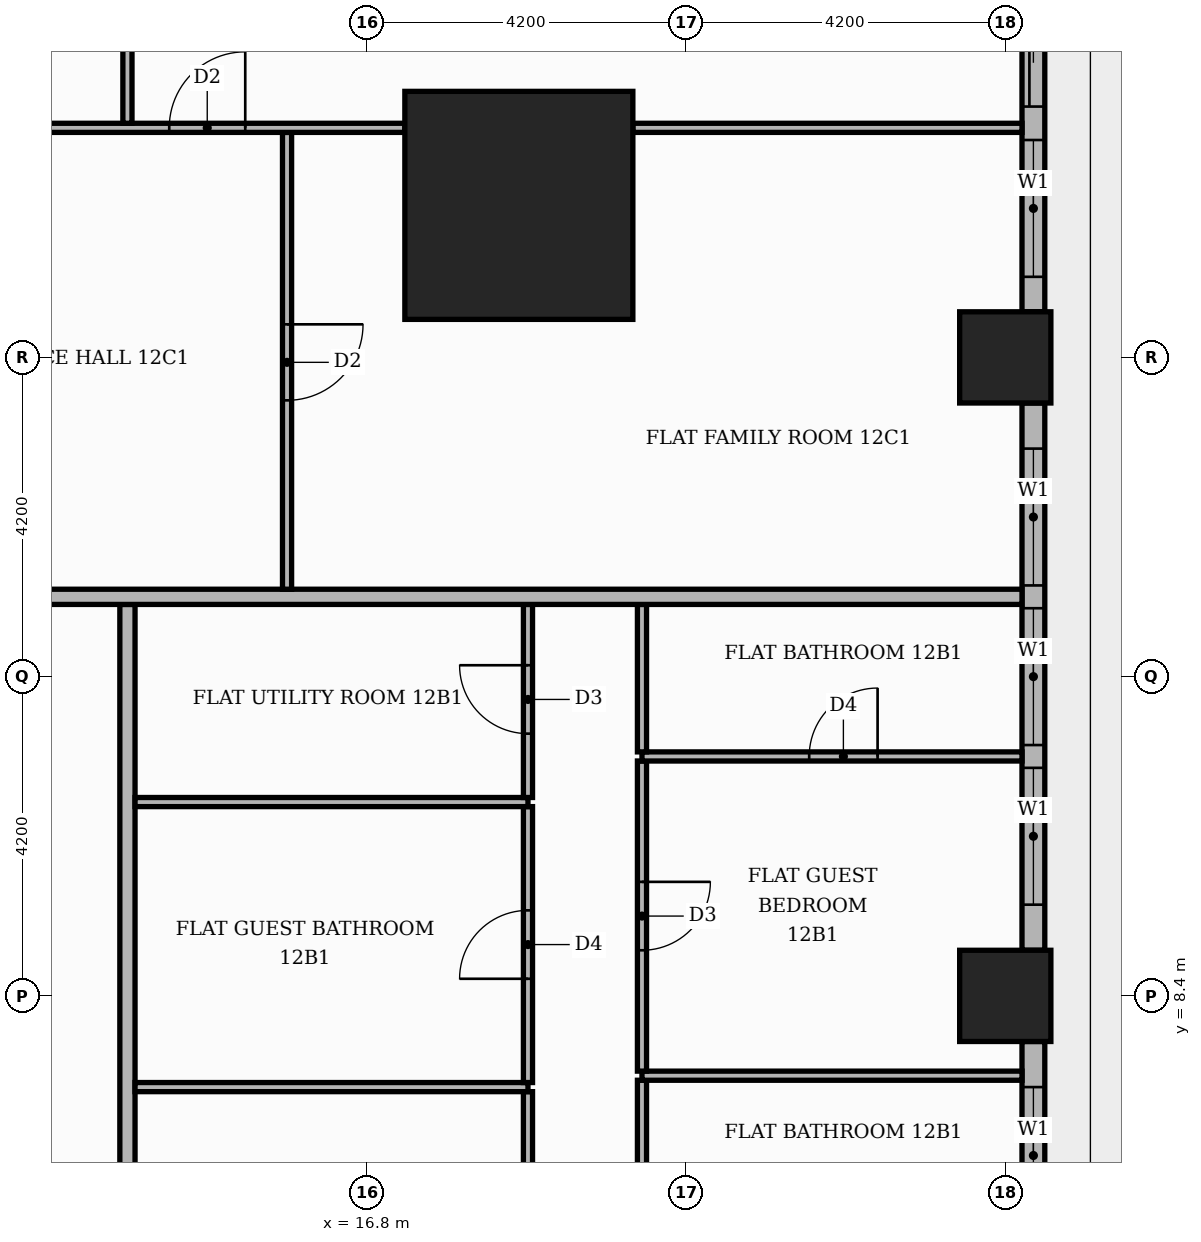
"""IFC4 building model, lengths in metres.
Left out: names, types, materials, properties, quantities, classifications, styles, units other than length and angle.
Written with IfcOpenShell. Run it as: python <this file> out.ifc"""

import sys

from ifc_helpers import new_model, si_unit, direction, frame, frame_2d, origin, origin_2d, place, context, subcontext, project, spatial, rectangle, extrude, element, fill, save


model = new_model("IFC4")
c1 = context("Model", 3, precision=1e-05, world=origin(), true_north=direction((0.0, 1.0)))
c2 = subcontext(c1, "Body", "Model", "MODEL_VIEW")
j1 = project(units=[si_unit("LENGTHUNIT", "METRE"), si_unit("PLANEANGLEUNIT", "RADIAN")], contexts=[c1])
p1 = place(None, origin())
s1 = spatial("IfcSite", under=j1, at=p1, CompositionType="ELEMENT")
p2 = place(p1, origin())
s2 = spatial("IfcBuilding", under=s1, at=p2, CompositionType="ELEMENT")
p3 = place(p2, frame((0.0, 0.0, 54.3)))
s3 = spatial("IfcBuildingStorey", under=s2, at=p3, CompositionType="ELEMENT", Elevation=54.3)
p4 = place(p3, frame((18.8, 18.8, 0.0), z_axis=(0.0, 0.0, 1.0), x_axis=(1.0, 0.0, 0.0)))
e1 = element("IfcColumn", 1, at=p4, inside=s3, PredefinedType="COLUMN", context=c2, shape_type="SweptSolid", body=[
    extrude(rectangle(XDim=3.0, YDim=3.0, at=origin_2d()), origin(), (0.0, 0.0, 1.0), 3.9),
])
for number, where, z_axis, x_axis in (
    (2, (25.2, 8.4, 0.0), (0.0, 0.0, 1.0), (1.0, 0.0, 0.0)),
    (3, (25.2, 16.8, 0.0), (0.0, 0.0, 1.0), (1.0, 0.0, 0.0)),
):
    element("IfcColumn", number, at=place(p3, frame(where, z_axis=z_axis, x_axis=x_axis)), inside=s3, PredefinedType="COLUMN", context=c2, shape_type="SweptSolid", body=[
        extrude(rectangle(XDim=1.2, YDim=1.2, at=origin_2d()), origin(), (0.0, 0.0, 1.0), 3.9),
    ])
p5 = place(p3, frame((25.57, 0.6, 0.0), z_axis=(0.0, 0.0, 1.0), x_axis=(0.0, 1.0, 0.0)))
e4 = element("IfcWall", 4, at=p5, inside=s3, PredefinedType="STANDARD", context=c2, shape_type="SweptSolid", body=[
    extrude(rectangle(XDim=7.2, YDim=0.3, at=frame_2d((3.6, 0.0))), origin(), (0.0, 0.0, 1.0), 3.48),
])
p6 = place(p5, frame((0.6, 0.0, 0.9)))
e5 = element("IfcOpeningElement", 5, at=p6, cuts=e4, PredefinedType="OPENING", context=c2, shape_type="SweptSolid", body=[
    extrude(rectangle(XDim=3.9, YDim=2.1, at=frame_2d((1.95, 1.05))), frame((0.0, 0.16, 0.0), z_axis=(0.0, -1.0, 0.0), x_axis=(1.0, 0.0, 0.0)), (0.0, 0.0, 1.0), 0.32),
])
p7 = place(p5, frame((4.8, 0.0, 0.9)))
e6 = element("IfcOpeningElement", 6, at=p7, cuts=e4, PredefinedType="OPENING", context=c2, shape_type="SweptSolid", body=[
    extrude(rectangle(XDim=1.8, YDim=2.1, at=frame_2d((0.9, 1.05))), frame((0.0, 0.16, 0.0), z_axis=(0.0, -1.0, 0.0), x_axis=(1.0, 0.0, 0.0)), (0.0, 0.0, 1.0), 0.32),
])
p8 = place(p3, frame((25.57, 9.0, 0.0), z_axis=(0.0, 0.0, 1.0), x_axis=(0.0, 1.0, 0.0)))
e7 = element("IfcWall", 7, at=p8, inside=s3, PredefinedType="STANDARD", context=c2, shape_type="SweptSolid", body=[
    extrude(rectangle(XDim=7.2, YDim=0.3, at=frame_2d((3.6, 0.0))), origin(), (0.0, 0.0, 1.0), 3.48),
])
p9 = place(p8, frame((0.6, 0.0, 0.9)))
e8 = element("IfcOpeningElement", 8, at=p9, cuts=e7, PredefinedType="OPENING", context=c2, shape_type="SweptSolid", body=[
    extrude(rectangle(XDim=1.8, YDim=2.1, at=frame_2d((0.9, 1.05))), frame((0.0, 0.16, 0.0), z_axis=(0.0, -1.0, 0.0), x_axis=(1.0, 0.0, 0.0)), (0.0, 0.0, 1.0), 0.32),
])
p10 = place(p8, frame((2.7, 0.0, 0.9)))
e9 = element("IfcOpeningElement", 9, at=p10, cuts=e7, PredefinedType="OPENING", context=c2, shape_type="SweptSolid", body=[
    extrude(rectangle(XDim=1.8, YDim=2.1, at=frame_2d((0.9, 1.05))), frame((0.0, 0.16, 0.0), z_axis=(0.0, -1.0, 0.0), x_axis=(1.0, 0.0, 0.0)), (0.0, 0.0, 1.0), 0.32),
])
p11 = place(p8, frame((4.8, 0.0, 0.9)))
e10 = element("IfcOpeningElement", 10, at=p11, cuts=e7, PredefinedType="OPENING", context=c2, shape_type="SweptSolid", body=[
    extrude(rectangle(XDim=1.8, YDim=2.1, at=frame_2d((0.9, 1.05))), frame((0.0, 0.16, 0.0), z_axis=(0.0, -1.0, 0.0), x_axis=(1.0, 0.0, 0.0)), (0.0, 0.0, 1.0), 0.32),
])
p12 = place(p3, frame((25.57, 17.4, 0.0), z_axis=(0.0, 0.0, 1.0), x_axis=(0.0, 1.0, 0.0)))
e11 = element("IfcWall", 11, at=p12, inside=s3, PredefinedType="STANDARD", context=c2, shape_type="SweptSolid", body=[
    extrude(rectangle(XDim=5.32, YDim=0.3, at=frame_2d((2.66, 0.0))), origin(), (0.0, 0.0, 1.0), 3.48),
])
p13 = place(p12, frame((2.7, 0.0, 0.0)))
e12 = element("IfcOpeningElement", 12, at=p13, cuts=e11, PredefinedType="OPENING", context=c2, shape_type="SweptSolid", body=[
    extrude(rectangle(XDim=1.8, YDim=2.4, at=frame_2d((0.9, 1.2))), frame((0.0, 0.16, 0.0), z_axis=(0.0, -1.0, 0.0), x_axis=(1.0, 0.0, 0.0)), (0.0, 0.0, 1.0), 0.32),
])
p14 = place(p12, frame((0.46, 0.0, 0.9)))
e13 = element("IfcOpeningElement", 13, at=p14, cuts=e11, PredefinedType="OPENING", context=c2, shape_type="SweptSolid", body=[
    extrude(rectangle(XDim=1.8, YDim=2.1, at=frame_2d((0.9, 1.05))), frame((0.0, 0.16, 0.0), z_axis=(0.0, -1.0, 0.0), x_axis=(1.0, 0.0, 0.0)), (0.0, 0.0, 1.0), 0.32),
])
p15 = place(p3, frame((13.65, -13.55, 0.0), z_axis=(0.0, 0.0, 1.0), x_axis=(0.0, 1.0, 0.0)))
e14 = element("IfcWall", 14, at=p15, inside=s3, PredefinedType="PARTITIONING", context=c2, shape_type="SweptSolid", body=[
    extrude(rectangle(XDim=27.1, YDim=0.2, at=frame_2d((13.55, 0.0))), origin(), (0.0, 0.0, 1.0), 3.48),
])
p16 = place(p15, frame((1.45, 0.0, 0.0)))
e15 = element("IfcOpeningElement", 15, at=p16, cuts=e14, PredefinedType="OPENING", context=c2, shape_type="SweptSolid", body=[
    extrude(rectangle(XDim=1.1, YDim=2.4, at=frame_2d((0.55, 1.2))), frame((0.0, 0.11, 0.0), z_axis=(0.0, -1.0, 0.0), x_axis=(1.0, 0.0, 0.0)), (0.0, 0.0, 1.0), 0.22),
])
p17 = place(p3, frame((18.92, 1.56, 0.0), z_axis=(0.0, 0.0, 1.0), x_axis=(0.0, 1.0, 0.0)))
e16 = element("IfcWall", 16, at=p17, inside=s3, PredefinedType="PARTITIONING", context=c2, shape_type="SweptSolid", body=[
    extrude(rectangle(XDim=5.58, YDim=0.12, at=frame_2d((2.79, 0.0))), origin(), (0.0, 0.0, 1.0), 3.48),
])
p18 = place(p17, frame((2.34, 0.0, 0.0)))
e17 = element("IfcOpeningElement", 17, at=p18, cuts=e16, PredefinedType="OPENING", context=c2, shape_type="SweptSolid", body=[
    extrude(rectangle(XDim=0.9, YDim=2.1, at=frame_2d((0.45, 1.05))), frame((0.0, 0.07, 0.0), z_axis=(0.0, -1.0, 0.0), x_axis=(1.0, 0.0, 0.0)), (0.0, 0.0, 1.0), 0.14),
])
p19 = place(p3, frame((20.42, 5.31, 0.0), z_axis=(0.0, 0.0, 1.0), x_axis=(0.0, 1.0, 0.0)))
e18 = element("IfcWall", 18, at=p19, inside=s3, PredefinedType="PARTITIONING", context=c2, shape_type="SweptSolid", body=[
    extrude(rectangle(XDim=1.98, YDim=0.12, at=frame_2d((0.99, 0.0))), origin(), (0.0, 0.0, 1.0), 3.48),
])
p20 = place(p3, frame((13.75, 7.2, 0.0), z_axis=(0.0, 0.0, 1.0), x_axis=(1.0, 0.0, 0.0)))
e19 = element("IfcWall", 19, at=p20, inside=s3, PredefinedType="PARTITIONING", context=c2, shape_type="SweptSolid", body=[
    extrude(rectangle(XDim=5.17, YDim=0.12, at=frame_2d((2.585, 0.0))), origin(), (0.0, 0.0, 1.0), 3.48),
])
p21 = place(p3, frame((18.92, 7.26, 0.0), z_axis=(0.0, 0.0, 1.0), x_axis=(0.0, 1.0, 0.0)))
e20 = element("IfcWall", 20, at=p21, inside=s3, PredefinedType="PARTITIONING", context=c2, shape_type="SweptSolid", body=[
    extrude(rectangle(XDim=3.63, YDim=0.12, at=frame_2d((1.815, 0.0))), origin(), (0.0, 0.0, 1.0), 3.48),
])
p22 = place(p21, frame((1.365, 0.0, 0.0)))
e21 = element("IfcOpeningElement", 21, at=p22, cuts=e20, PredefinedType="OPENING", context=c2, shape_type="SweptSolid", body=[
    extrude(rectangle(XDim=0.9, YDim=2.1, at=frame_2d((0.45, 1.05))), frame((0.0, 0.07, 0.0), z_axis=(0.0, -1.0, 0.0), x_axis=(1.0, 0.0, 0.0)), (0.0, 0.0, 1.0), 0.14),
])
p23 = place(p3, frame((20.42, 7.35, 0.0), z_axis=(0.0, 0.0, 1.0), x_axis=(1.0, 0.0, 0.0)))
e22 = element("IfcWall", 22, at=p23, inside=s3, PredefinedType="PARTITIONING", context=c2, shape_type="SweptSolid", body=[
    extrude(rectangle(XDim=5.0, YDim=0.12, at=frame_2d((2.5, 0.0))), origin(), (0.0, 0.0, 1.0), 3.48),
])
p24 = place(p3, frame((20.42, 7.41, 0.0), z_axis=(0.0, 0.0, 1.0), x_axis=(0.0, 1.0, 0.0)))
e23 = element("IfcWall", 23, at=p24, inside=s3, PredefinedType="PARTITIONING", context=c2, shape_type="SweptSolid", body=[
    extrude(rectangle(XDim=4.08, YDim=0.12, at=frame_2d((2.04, 0.0))), origin(), (0.0, 0.0, 1.0), 3.48),
])
p25 = place(p24, frame((1.59, 0.0, 0.0)))
e24 = element("IfcOpeningElement", 24, at=p25, cuts=e23, PredefinedType="OPENING", context=c2, shape_type="SweptSolid", body=[
    extrude(rectangle(XDim=0.9, YDim=2.1, at=frame_2d((0.45, 1.05))), frame((0.0, 0.07, 0.0), z_axis=(0.0, -1.0, 0.0), x_axis=(1.0, 0.0, 0.0)), (0.0, 0.0, 1.0), 0.14),
])
p26 = place(p3, frame((13.75, 10.95, 0.0), z_axis=(0.0, 0.0, 1.0), x_axis=(1.0, 0.0, 0.0)))
e25 = element("IfcWall", 25, at=p26, inside=s3, PredefinedType="PARTITIONING", context=c2, shape_type="SweptSolid", body=[
    extrude(rectangle(XDim=5.17, YDim=0.12, at=frame_2d((2.585, 0.0))), origin(), (0.0, 0.0, 1.0), 3.48),
])
p27 = place(p3, frame((18.92, 11.01, 0.0), z_axis=(0.0, 0.0, 1.0), x_axis=(0.0, 1.0, 0.0)))
e26 = element("IfcWall", 26, at=p27, inside=s3, PredefinedType="PARTITIONING", context=c2, shape_type="SweptSolid", body=[
    extrude(rectangle(XDim=2.54, YDim=0.12, at=frame_2d((1.27, 0.0))), origin(), (0.0, 0.0, 1.0), 3.48),
])
p28 = place(p27, frame((0.84, 0.0, 0.0)))
e27 = element("IfcOpeningElement", 27, at=p28, cuts=e26, PredefinedType="OPENING", context=c2, shape_type="SweptSolid", body=[
    extrude(rectangle(XDim=0.9, YDim=2.1, at=frame_2d((0.45, 1.05))), frame((0.0, 0.07, 0.0), z_axis=(0.0, -1.0, 0.0), x_axis=(1.0, 0.0, 0.0)), (0.0, 0.0, 1.0), 0.14),
])
p29 = place(p3, frame((20.42, 11.55, 0.0), z_axis=(0.0, 0.0, 1.0), x_axis=(1.0, 0.0, 0.0)))
e28 = element("IfcWall", 28, at=p29, inside=s3, PredefinedType="PARTITIONING", context=c2, shape_type="SweptSolid", body=[
    extrude(rectangle(XDim=5.0, YDim=0.12, at=frame_2d((2.5, 0.0))), origin(), (0.0, 0.0, 1.0), 3.48),
])
p30 = place(p29, frame((2.2, 0.0, 0.0)))
e29 = element("IfcOpeningElement", 29, at=p30, cuts=e28, PredefinedType="OPENING", context=c2, shape_type="SweptSolid", body=[
    extrude(rectangle(XDim=0.9, YDim=2.1, at=frame_2d((0.45, 1.05))), frame((0.0, 0.07, 0.0), z_axis=(0.0, -1.0, 0.0), x_axis=(1.0, 0.0, 0.0)), (0.0, 0.0, 1.0), 0.14),
])
p31 = place(p3, frame((20.42, 11.61, 0.0), z_axis=(0.0, 0.0, 1.0), x_axis=(0.0, 1.0, 0.0)))
e30 = element("IfcWall", 30, at=p31, inside=s3, PredefinedType="PARTITIONING", context=c2, shape_type="SweptSolid", body=[
    extrude(rectangle(XDim=1.94, YDim=0.12, at=frame_2d((0.97, 0.0))), origin(), (0.0, 0.0, 1.0), 3.48),
])
p32 = place(p3, frame((-13.65, 13.65, 0.0), z_axis=(0.0, 0.0, 1.0), x_axis=(1.0, 0.0, 0.0)))
e31 = element("IfcWall", 31, at=p32, inside=s3, PredefinedType="PARTITIONING", context=c2, shape_type="SweptSolid", body=[
    extrude(rectangle(XDim=39.07, YDim=0.2, at=frame_2d((19.535, 0.0))), origin(), (0.0, 0.0, 1.0), 3.48),
])
p33 = place(p32, frame((24.65, 0.0, 0.0)))
e32 = element("IfcOpeningElement", 32, at=p33, cuts=e31, PredefinedType="OPENING", context=c2, shape_type="SweptSolid", body=[
    extrude(rectangle(XDim=1.1, YDim=2.4, at=frame_2d((0.55, 1.2))), frame((0.0, 0.11, 0.0), z_axis=(0.0, -1.0, 0.0), x_axis=(1.0, 0.0, 0.0)), (0.0, 0.0, 1.0), 0.22),
])
p34 = place(p32, frame((14.15, 0.0, 0.0)))
e33 = element("IfcOpeningElement", 33, at=p34, cuts=e31, PredefinedType="OPENING", context=c2, shape_type="SweptSolid", body=[
    extrude(rectangle(XDim=1.1, YDim=2.4, at=frame_2d((0.55, 1.2))), frame((0.0, 0.11, 0.0), z_axis=(0.0, -1.0, 0.0), x_axis=(1.0, 0.0, 0.0)), (0.0, 0.0, 1.0), 0.22),
])
p35 = place(p3, frame((15.75, 13.75, 0.0), z_axis=(0.0, 0.0, 1.0), x_axis=(0.0, 1.0, 0.0)))
e34 = element("IfcWall", 34, at=p35, inside=s3, PredefinedType="PARTITIONING", context=c2, shape_type="SweptSolid", body=[
    extrude(rectangle(XDim=6.01, YDim=0.12, at=frame_2d((3.005, 0.0))), origin(), (0.0, 0.0, 1.0), 3.48),
])
p36 = place(p35, frame((2.485, 0.0, 0.0)))
e35 = element("IfcOpeningElement", 35, at=p36, cuts=e34, PredefinedType="OPENING", context=c2, shape_type="SweptSolid", body=[
    extrude(rectangle(XDim=1.0, YDim=2.1, at=frame_2d((0.5, 1.05))), frame((0.0, 0.07, 0.0), z_axis=(0.0, -1.0, 0.0), x_axis=(1.0, 0.0, 0.0)), (0.0, 0.0, 1.0), 0.14),
])
p37 = place(p3, frame((5.35, 19.82, 0.0), z_axis=(0.0, 0.0, 1.0), x_axis=(1.0, 0.0, 0.0)))
e36 = element("IfcWall", 36, at=p37, inside=s3, PredefinedType="PARTITIONING", context=c2, shape_type="SweptSolid", body=[
    extrude(rectangle(XDim=11.95, YDim=0.12, at=frame_2d((5.975, 0.0))), origin(), (0.0, 0.0, 1.0), 3.48),
])
p38 = place(p37, frame((8.85, 0.0, 0.0)))
e37 = element("IfcOpeningElement", 37, at=p38, cuts=e36, PredefinedType="OPENING", context=c2, shape_type="SweptSolid", body=[
    extrude(rectangle(XDim=1.0, YDim=2.1, at=frame_2d((0.5, 1.05))), frame((0.0, 0.07, 0.0), z_axis=(0.0, -1.0, 0.0), x_axis=(1.0, 0.0, 0.0)), (0.0, 0.0, 1.0), 0.14),
])
p39 = place(p37, frame((5.75, 0.0, 0.0)))
e38 = element("IfcOpeningElement", 38, at=p39, cuts=e36, PredefinedType="OPENING", context=c2, shape_type="SweptSolid", body=[
    extrude(rectangle(XDim=0.9, YDim=2.1, at=frame_2d((0.45, 1.05))), frame((0.0, 0.07, 0.0), z_axis=(0.0, -1.0, 0.0), x_axis=(1.0, 0.0, 0.0)), (0.0, 0.0, 1.0), 0.14),
])
p40 = place(p3, frame((20.3, 19.82, 0.0), z_axis=(0.0, 0.0, 1.0), x_axis=(1.0, 0.0, 0.0)))
e39 = element("IfcWall", 39, at=p40, inside=s3, PredefinedType="PARTITIONING", context=c2, shape_type="SweptSolid", body=[
    extrude(rectangle(XDim=5.12, YDim=0.12, at=frame_2d((2.56, 0.0))), origin(), (0.0, 0.0, 1.0), 3.48),
])
p41 = place(p3, frame((13.65, 19.88, 0.0), z_axis=(0.0, 0.0, 1.0), x_axis=(0.0, 1.0, 0.0)))
e40 = element("IfcWall", 40, at=p41, inside=s3, PredefinedType="PARTITIONING", context=c2, shape_type="SweptSolid", body=[
    extrude(rectangle(XDim=5.54, YDim=0.12, at=frame_2d((2.77, 0.0))), origin(), (0.0, 0.0, 1.0), 3.48),
])
p42 = place(p7, origin())
e41 = element("IfcWindow", 41, at=p42, inside=s3, PartitioningType="SINGLE_PANEL", PredefinedType="WINDOW", context=c2, shape_type="SweptSolid", body=[
    extrude(rectangle(XDim=1.8, YDim=2.1, at=frame_2d((0.9, 1.05))), frame((0.0, 0.03, 0.0), z_axis=(0.0, -1.0, 0.0), x_axis=(1.0, 0.0, 0.0)), (0.0, 0.0, 1.0), 0.06),
])
fill(e6, e41)
p43 = place(p9, origin())
e42 = element("IfcWindow", 42, at=p43, inside=s3, PartitioningType="SINGLE_PANEL", PredefinedType="WINDOW", context=c2, shape_type="SweptSolid", body=[
    extrude(rectangle(XDim=1.8, YDim=2.1, at=frame_2d((0.9, 1.05))), frame((0.0, 0.03, 0.0), z_axis=(0.0, -1.0, 0.0), x_axis=(1.0, 0.0, 0.0)), (0.0, 0.0, 1.0), 0.06),
])
fill(e8, e42)
p44 = place(p10, origin())
e43 = element("IfcWindow", 43, at=p44, inside=s3, PartitioningType="SINGLE_PANEL", PredefinedType="WINDOW", context=c2, shape_type="SweptSolid", body=[
    extrude(rectangle(XDim=1.8, YDim=2.1, at=frame_2d((0.9, 1.05))), frame((0.0, 0.03, 0.0), z_axis=(0.0, -1.0, 0.0), x_axis=(1.0, 0.0, 0.0)), (0.0, 0.0, 1.0), 0.06),
])
fill(e9, e43)
p45 = place(p11, origin())
e44 = element("IfcWindow", 44, at=p45, inside=s3, PartitioningType="SINGLE_PANEL", PredefinedType="WINDOW", context=c2, shape_type="SweptSolid", body=[
    extrude(rectangle(XDim=1.8, YDim=2.1, at=frame_2d((0.9, 1.05))), frame((0.0, 0.03, 0.0), z_axis=(0.0, -1.0, 0.0), x_axis=(1.0, 0.0, 0.0)), (0.0, 0.0, 1.0), 0.06),
])
fill(e10, e44)
p46 = place(p13, origin())
e45 = element("IfcDoor", 45, at=p46, inside=s3, OperationType="SLIDING_TO_LEFT", PredefinedType="DOOR", context=c2, shape_type="SweptSolid", body=[
    extrude(rectangle(XDim=1.8, YDim=2.4, at=frame_2d((0.9, 1.2))), frame((0.0, 0.025, 0.0), z_axis=(0.0, -1.0, 0.0), x_axis=(1.0, 0.0, 0.0)), (0.0, 0.0, 1.0), 0.05),
])
fill(e12, e45)
p47 = place(p14, origin())
e46 = element("IfcWindow", 46, at=p47, inside=s3, PartitioningType="SINGLE_PANEL", PredefinedType="WINDOW", context=c2, shape_type="SweptSolid", body=[
    extrude(rectangle(XDim=1.8, YDim=2.1, at=frame_2d((0.9, 1.05))), frame((0.0, 0.03, 0.0), z_axis=(0.0, -1.0, 0.0), x_axis=(1.0, 0.0, 0.0)), (0.0, 0.0, 1.0), 0.06),
])
fill(e13, e46)
p48 = place(p22, origin())
e47 = element("IfcDoor", 47, at=p48, inside=s3, OperationType="SINGLE_SWING_LEFT", PredefinedType="DOOR", context=c2, shape_type="SweptSolid", body=[
    extrude(rectangle(XDim=0.9, YDim=2.1, at=frame_2d((0.45, 1.05))), frame((0.0, 0.025, 0.0), z_axis=(0.0, -1.0, 0.0), x_axis=(1.0, 0.0, 0.0)), (0.0, 0.0, 1.0), 0.05),
])
fill(e21, e47)
p49 = place(p28, origin())
e48 = element("IfcDoor", 48, at=p49, inside=s3, OperationType="SINGLE_SWING_RIGHT", PredefinedType="DOOR", context=c2, shape_type="SweptSolid", body=[
    extrude(rectangle(XDim=0.9, YDim=2.1, at=frame_2d((0.45, 1.05))), frame((0.0, 0.025, 0.0), z_axis=(0.0, -1.0, 0.0), x_axis=(1.0, 0.0, 0.0)), (0.0, 0.0, 1.0), 0.05),
])
fill(e27, e48)
p50 = place(p25, frame((0.9, 0.0, 0.0), z_axis=(0.0, 0.0, 1.0), x_axis=(-1.0, 0.0, 0.0)))
e49 = element("IfcDoor", 49, at=p50, inside=s3, OperationType="SINGLE_SWING_RIGHT", PredefinedType="DOOR", context=c2, shape_type="SweptSolid", body=[
    extrude(rectangle(XDim=0.9, YDim=2.1, at=frame_2d((0.45, 1.05))), frame((0.0, 0.025, 0.0), z_axis=(0.0, -1.0, 0.0), x_axis=(1.0, 0.0, 0.0)), (0.0, 0.0, 1.0), 0.05),
])
fill(e24, e49)
p51 = place(p30, origin())
e50 = element("IfcDoor", 50, at=p51, inside=s3, OperationType="SINGLE_SWING_RIGHT", PredefinedType="DOOR", context=c2, shape_type="SweptSolid", body=[
    extrude(rectangle(XDim=0.9, YDim=2.1, at=frame_2d((0.45, 1.05))), frame((0.0, 0.025, 0.0), z_axis=(0.0, -1.0, 0.0), x_axis=(1.0, 0.0, 0.0)), (0.0, 0.0, 1.0), 0.05),
])
fill(e29, e50)
p52 = place(p36, frame((1.0, 0.0, 0.0), z_axis=(0.0, 0.0, 1.0), x_axis=(-1.0, 0.0, 0.0)))
e51 = element("IfcDoor", 51, at=p52, inside=s3, OperationType="SINGLE_SWING_RIGHT", PredefinedType="DOOR", context=c2, shape_type="SweptSolid", body=[
    extrude(rectangle(XDim=1.0, YDim=2.1, at=frame_2d((0.5, 1.05))), frame((0.0, 0.025, 0.0), z_axis=(0.0, -1.0, 0.0), x_axis=(1.0, 0.0, 0.0)), (0.0, 0.0, 1.0), 0.05),
])
fill(e35, e51)
p53 = place(p38, origin())
e52 = element("IfcDoor", 52, at=p53, inside=s3, OperationType="SINGLE_SWING_RIGHT", PredefinedType="DOOR", context=c2, shape_type="SweptSolid", body=[
    extrude(rectangle(XDim=1.0, YDim=2.1, at=frame_2d((0.5, 1.05))), frame((0.0, 0.025, 0.0), z_axis=(0.0, -1.0, 0.0), x_axis=(1.0, 0.0, 0.0)), (0.0, 0.0, 1.0), 0.05),
])
fill(e37, e52)
save(model, sys.argv[1])
